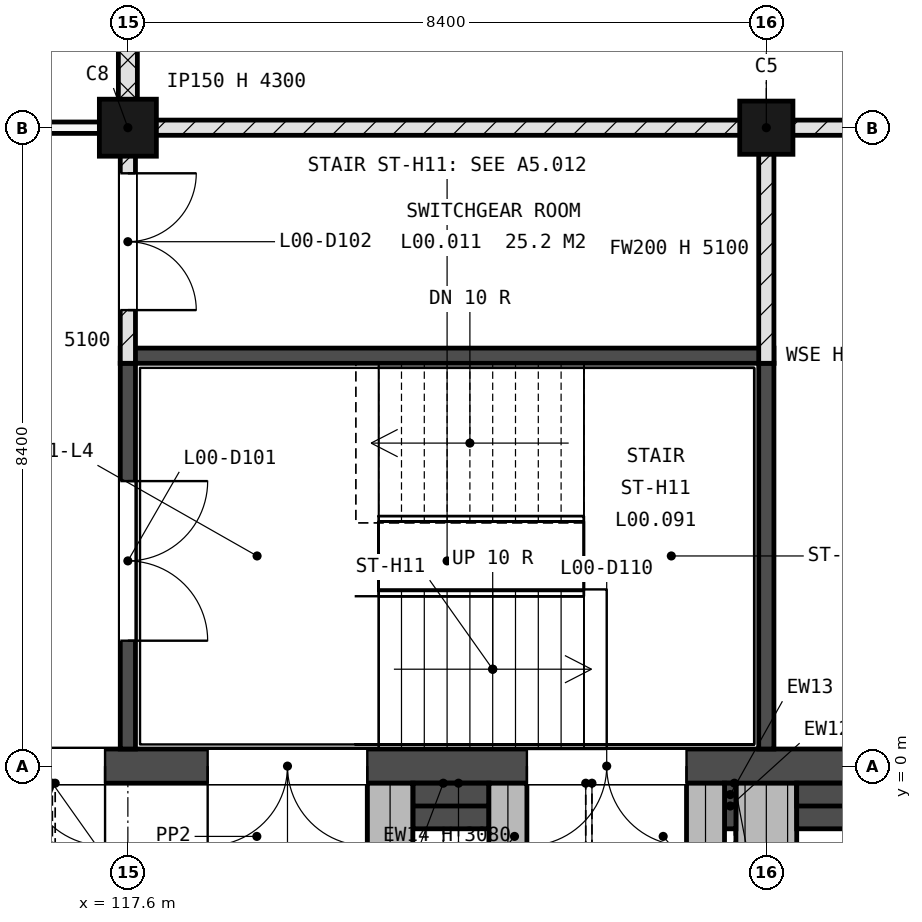
"""IFC4 building model, lengths in metres.
Left out: names, types, materials, properties, quantities, classifications, styles, units other than length and angle.
Written with IfcOpenShell. Run it as: python <this file> out.ifc"""

import sys

from ifc_helpers import new_model, si_unit, direction, frame, frame_2d, origin, origin_2d, place, context, subcontext, project, spatial, rectangle, extrude, element, fill, save


model = new_model("IFC4")
c1 = context("Model", 3, precision=1e-05, world=origin(), true_north=direction((0.0, 1.0)))
c2 = subcontext(c1, "Body", "Model", "MODEL_VIEW")
j1 = project(units=[si_unit("LENGTHUNIT", "METRE"), si_unit("PLANEANGLEUNIT", "RADIAN")], contexts=[c1])
p1 = place(None, origin())
s1 = spatial("IfcSite", under=j1, at=p1, CompositionType="ELEMENT")
p2 = place(p1, origin())
s2 = spatial("IfcBuilding", under=s1, at=p2, CompositionType="ELEMENT")
p3 = place(p2, origin())
s3 = spatial("IfcBuildingStorey", under=s2, at=p3, CompositionType="ELEMENT", Elevation=0.0)
p4 = place(p3, frame((117.6, 8.4, -0.3), z_axis=(0.0, 0.0, 1.0), x_axis=(1.0, 0.0, 0.0)))
e1 = element("IfcColumn", 1, at=p4, inside=s3, PredefinedType="COLUMN", context=c2, shape_type="SweptSolid", body=[
    extrude(rectangle(XDim=0.75, YDim=0.75, at=origin_2d()), origin(), (0.0, 0.0, 1.0), 5.4),
])
p5 = place(p3, frame((126.0, 8.4, -0.3), z_axis=(0.0, 0.0, 1.0), x_axis=(1.0, 0.0, 0.0)))
e2 = element("IfcColumn", 2, at=p5, inside=s3, PredefinedType="COLUMN", context=c2, shape_type="SweptSolid", body=[
    extrude(rectangle(XDim=0.7, YDim=0.7, at=origin_2d()), origin(), (0.0, 0.0, 1.0), 5.4),
])
p6 = place(p3, frame((0.0, 0.0, -0.3), z_axis=(0.0, 0.0, 1.0), x_axis=(1.0, 0.0, 0.0)))
e3 = element("IfcWall", 3, at=p6, inside=s3, PredefinedType="SOLIDWALL", context=c2, shape_type="SweptSolid", body=[
    extrude(rectangle(XDim=168.0, YDim=0.45, at=frame_2d((84.0, 0.0))), origin(), (0.0, 0.0, 1.0), 5.4),
])
p7 = place(p6, frame((34.8, 0.0, 2.7)))
e4 = element("IfcOpeningElement", 4, at=p7, cuts=e3, PredefinedType="OPENING", context=c2, shape_type="SweptSolid", body=[
    extrude(rectangle(XDim=1.8, YDim=1.2, at=frame_2d((0.9, 0.6))), frame((0.0, 0.235, 0.0), z_axis=(0.0, -1.0, 0.0), x_axis=(1.0, 0.0, 0.0)), (0.0, 0.0, 1.0), 0.47),
])
p8 = place(p6, frame((69.075, 0.0, 1.5)))
e5 = element("IfcOpeningElement", 5, at=p8, cuts=e3, PredefinedType="OPENING", context=c2, shape_type="SweptSolid", body=[
    extrude(rectangle(XDim=0.45, YDim=2.4, at=frame_2d((0.225, 1.2))), frame((0.0, 0.235, 0.0), z_axis=(0.0, -1.0, 0.0), x_axis=(1.0, 0.0, 0.0)), (0.0, 0.0, 1.0), 0.47),
])
p9 = place(p6, frame((73.275, 0.0, 1.5)))
e6 = element("IfcOpeningElement", 6, at=p9, cuts=e3, PredefinedType="OPENING", context=c2, shape_type="SweptSolid", body=[
    extrude(rectangle(XDim=0.45, YDim=2.4, at=frame_2d((0.225, 1.2))), frame((0.0, 0.235, 0.0), z_axis=(0.0, -1.0, 0.0), x_axis=(1.0, 0.0, 0.0)), (0.0, 0.0, 1.0), 0.47),
])
p10 = place(p6, frame((135.0, 0.0, 2.7)))
e7 = element("IfcOpeningElement", 7, at=p10, cuts=e3, PredefinedType="OPENING", context=c2, shape_type="SweptSolid", body=[
    extrude(rectangle(XDim=1.8, YDim=1.2, at=frame_2d((0.9, 0.6))), frame((0.0, 0.235, 0.0), z_axis=(0.0, -1.0, 0.0), x_axis=(1.0, 0.0, 0.0)), (0.0, 0.0, 1.0), 0.47),
])
p11 = place(p6, frame((144.0, 0.0, 2.7)))
e8 = element("IfcOpeningElement", 8, at=p11, cuts=e3, PredefinedType="OPENING", context=c2, shape_type="SweptSolid", body=[
    extrude(rectangle(XDim=1.8, YDim=1.2, at=frame_2d((0.9, 0.6))), frame((0.0, 0.235, 0.0), z_axis=(0.0, -1.0, 0.0), x_axis=(1.0, 0.0, 0.0)), (0.0, 0.0, 1.0), 0.47),
])
p12 = place(p6, frame((114.6, 0.0, 0.3), z_axis=(0.0, 0.0, 1.0), x_axis=(-1.0, 0.0, 0.0)))
e9 = element("IfcOpeningElement", 9, at=p12, cuts=e3, PredefinedType="OPENING", context=c2, shape_type="SweptSolid", body=[
    extrude(rectangle(XDim=2.1, YDim=2.2, at=frame_2d((1.05, 1.1))), frame((0.0, 0.235, 0.0), z_axis=(0.0, -1.0, 0.0), x_axis=(1.0, 0.0, 0.0)), (0.0, 0.0, 1.0), 0.47),
])
p13 = place(p6, frame((117.3, 0.0, 0.3), z_axis=(0.0, 0.0, 1.0), x_axis=(-1.0, 0.0, 0.0)))
e10 = element("IfcOpeningElement", 10, at=p13, cuts=e3, PredefinedType="OPENING", context=c2, shape_type="SweptSolid", body=[
    extrude(rectangle(XDim=2.1, YDim=2.2, at=frame_2d((1.05, 1.1))), frame((0.0, 0.235, 0.0), z_axis=(0.0, -1.0, 0.0), x_axis=(1.0, 0.0, 0.0)), (0.0, 0.0, 1.0), 0.47),
])
p14 = place(p6, frame((106.05, 0.0, 0.3), z_axis=(0.0, 0.0, 1.0), x_axis=(-1.0, 0.0, 0.0)))
e11 = element("IfcOpeningElement", 11, at=p14, cuts=e3, PredefinedType="OPENING", context=c2, shape_type="SweptSolid", body=[
    extrude(rectangle(XDim=2.1, YDim=2.2, at=frame_2d((1.05, 1.1))), frame((0.0, 0.235, 0.0), z_axis=(0.0, -1.0, 0.0), x_axis=(1.0, 0.0, 0.0)), (0.0, 0.0, 1.0), 0.47),
])
p15 = place(p6, frame((57.25, 0.0, 0.3), z_axis=(0.0, 0.0, 1.0), x_axis=(-1.0, 0.0, 0.0)))
e12 = element("IfcOpeningElement", 12, at=p15, cuts=e3, PredefinedType="OPENING", context=c2, shape_type="SweptSolid", body=[
    extrude(rectangle(XDim=2.1, YDim=2.2, at=frame_2d((1.05, 1.1))), frame((0.0, 0.235, 0.0), z_axis=(0.0, -1.0, 0.0), x_axis=(1.0, 0.0, 0.0)), (0.0, 0.0, 1.0), 0.47),
])
p16 = place(p6, frame((120.75, 0.0, 0.3), z_axis=(0.0, 0.0, 1.0), x_axis=(-1.0, 0.0, 0.0)))
e13 = element("IfcOpeningElement", 13, at=p16, cuts=e3, PredefinedType="OPENING", context=c2, shape_type="SweptSolid", body=[
    extrude(rectangle(XDim=2.1, YDim=2.2, at=frame_2d((1.05, 1.1))), frame((0.0, 0.235, 0.0), z_axis=(0.0, -1.0, 0.0), x_axis=(1.0, 0.0, 0.0)), (0.0, 0.0, 1.0), 0.47),
])
p17 = place(p6, frame((124.95, 0.0, 0.3), z_axis=(0.0, 0.0, 1.0), x_axis=(-1.0, 0.0, 0.0)))
e14 = element("IfcOpeningElement", 14, at=p17, cuts=e3, PredefinedType="OPENING", context=c2, shape_type="SweptSolid", body=[
    extrude(rectangle(XDim=2.1, YDim=2.2, at=frame_2d((1.05, 1.1))), frame((0.0, 0.235, 0.0), z_axis=(0.0, -1.0, 0.0), x_axis=(1.0, 0.0, 0.0)), (0.0, 0.0, 1.0), 0.47),
])
p18 = place(p6, frame((19.45, 0.0, 0.3), z_axis=(0.0, 0.0, 1.0), x_axis=(-1.0, 0.0, 0.0)))
e15 = element("IfcOpeningElement", 15, at=p18, cuts=e3, PredefinedType="OPENING", context=c2, shape_type="SweptSolid", body=[
    extrude(rectangle(XDim=2.1, YDim=2.2, at=frame_2d((1.05, 1.1))), frame((0.0, 0.235, 0.0), z_axis=(0.0, -1.0, 0.0), x_axis=(1.0, 0.0, 0.0)), (0.0, 0.0, 1.0), 0.47),
])
p19 = place(p6, frame((162.25, 0.0, 0.3), z_axis=(0.0, 0.0, 1.0), x_axis=(-1.0, 0.0, 0.0)))
e16 = element("IfcOpeningElement", 16, at=p19, cuts=e3, PredefinedType="OPENING", context=c2, shape_type="SweptSolid", body=[
    extrude(rectangle(XDim=2.1, YDim=2.2, at=frame_2d((1.05, 1.1))), frame((0.0, 0.235, 0.0), z_axis=(0.0, -1.0, 0.0), x_axis=(1.0, 0.0, 0.0)), (0.0, 0.0, 1.0), 0.47),
])
p20 = place(p6, frame((4.8, 0.0, 0.3), z_axis=(0.0, 0.0, 1.0), x_axis=(-1.0, 0.0, 0.0)))
e17 = element("IfcOpeningElement", 17, at=p20, cuts=e3, PredefinedType="OPENING", context=c2, shape_type="SweptSolid", body=[
    extrude(rectangle(XDim=1.2, YDim=2.2, at=frame_2d((0.6, 1.1))), frame((0.0, 0.235, 0.0), z_axis=(0.0, -1.0, 0.0), x_axis=(1.0, 0.0, 0.0)), (0.0, 0.0, 1.0), 0.47),
])
p21 = place(p6, frame((64.8, 0.0, 0.3), z_axis=(0.0, 0.0, 1.0), x_axis=(-1.0, 0.0, 0.0)))
e18 = element("IfcOpeningElement", 18, at=p21, cuts=e3, PredefinedType="OPENING", context=c2, shape_type="SweptSolid", body=[
    extrude(rectangle(XDim=1.2, YDim=2.2, at=frame_2d((0.6, 1.1))), frame((0.0, 0.235, 0.0), z_axis=(0.0, -1.0, 0.0), x_axis=(1.0, 0.0, 0.0)), (0.0, 0.0, 1.0), 0.47),
])
p22 = place(p6, frame((81.0, 0.0, 0.3), z_axis=(0.0, 0.0, 1.0), x_axis=(-1.0, 0.0, 0.0)))
e19 = element("IfcOpeningElement", 19, at=p22, cuts=e3, PredefinedType="OPENING", context=c2, shape_type="SweptSolid", body=[
    extrude(rectangle(XDim=2.4, YDim=2.4, at=frame_2d((1.2, 1.2))), frame((0.0, 0.235, 0.0), z_axis=(0.0, -1.0, 0.0), x_axis=(1.0, 0.0, 0.0)), (0.0, 0.0, 1.0), 0.47),
])
p23 = place(p6, frame((97.8, 0.0, 0.3), z_axis=(0.0, 0.0, 1.0), x_axis=(-1.0, 0.0, 0.0)))
e20 = element("IfcOpeningElement", 20, at=p23, cuts=e3, PredefinedType="OPENING", context=c2, shape_type="SweptSolid", body=[
    extrude(rectangle(XDim=2.4, YDim=2.4, at=frame_2d((1.2, 1.2))), frame((0.0, 0.235, 0.0), z_axis=(0.0, -1.0, 0.0), x_axis=(1.0, 0.0, 0.0)), (0.0, 0.0, 1.0), 0.47),
])
p24 = place(p6, frame((139.8, 0.0, 0.3), z_axis=(0.0, 0.0, 1.0), x_axis=(-1.0, 0.0, 0.0)))
e21 = element("IfcOpeningElement", 21, at=p24, cuts=e3, PredefinedType="OPENING", context=c2, shape_type="SweptSolid", body=[
    extrude(rectangle(XDim=2.4, YDim=2.1, at=frame_2d((1.2, 1.05))), frame((0.0, 0.235, 0.0), z_axis=(0.0, -1.0, 0.0), x_axis=(1.0, 0.0, 0.0)), (0.0, 0.0, 1.0), 0.47),
])
p25 = place(p6, frame((156.3, 0.0, 0.3), z_axis=(0.0, 0.0, 1.0), x_axis=(-1.0, 0.0, 0.0)))
e22 = element("IfcOpeningElement", 22, at=p25, cuts=e3, PredefinedType="OPENING", context=c2, shape_type="SweptSolid", body=[
    extrude(rectangle(XDim=1.8, YDim=2.2, at=frame_2d((0.9, 1.1))), frame((0.0, 0.235, 0.0), z_axis=(0.0, -1.0, 0.0), x_axis=(1.0, 0.0, 0.0)), (0.0, 0.0, 1.0), 0.47),
])
p26 = place(p3, frame((126.0, -0.225, 0.0), z_axis=(0.0, 0.0, 1.0), x_axis=(0.0, -1.0, 0.0)))
e23 = element("IfcWall", 23, at=p26, inside=s3, PredefinedType="SOLIDWALL", context=c2, shape_type="SweptSolid", body=[
    extrude(rectangle(XDim=0.9, YDim=0.8, at=frame_2d((0.45, 0.0))), origin(), (0.0, 0.0, 1.0), 5.1),
])
p27 = place(p3, frame((121.35, -0.525, 0.0), z_axis=(0.0, 0.0, 1.0), x_axis=(1.0, 0.0, 0.0)))
e24 = element("IfcWall", 24, at=p27, inside=s3, PredefinedType="SOLIDWALL", context=c2, shape_type="SweptSolid", body=[
    extrude(rectangle(XDim=1.0, YDim=0.6, at=frame_2d((0.5, 0.0))), origin(), (0.0, 0.0, 1.0), 0.45),
])
p28 = place(p3, frame((121.35, -0.375, 0.45), z_axis=(0.0, 0.0, 1.0), x_axis=(1.0, 0.0, 0.0)))
e25 = element("IfcWall", 25, at=p28, inside=s3, PredefinedType="SOLIDWALL", context=c2, shape_type="SweptSolid", body=[
    extrude(rectangle(XDim=1.0, YDim=0.3, at=frame_2d((0.5, 0.0))), origin(), (0.0, 0.0, 1.0), 0.45),
])
p29 = place(p3, frame((125.45, -0.525, 0.0), z_axis=(0.0, 0.0, 1.0), x_axis=(1.0, 0.0, 0.0)))
e26 = element("IfcWall", 26, at=p29, inside=s3, PredefinedType="SOLIDWALL", context=c2, shape_type="SweptSolid", body=[
    extrude(rectangle(XDim=0.15, YDim=0.6, at=frame_2d((0.075, 0.0))), origin(), (0.0, 0.0, 1.0), 0.45),
])
p30 = place(p3, frame((125.45, -0.375, 0.45), z_axis=(0.0, 0.0, 1.0), x_axis=(1.0, 0.0, 0.0)))
e27 = element("IfcWall", 27, at=p30, inside=s3, PredefinedType="SOLIDWALL", context=c2, shape_type="SweptSolid", body=[
    extrude(rectangle(XDim=0.15, YDim=0.3, at=frame_2d((0.075, 0.0))), origin(), (0.0, 0.0, 1.0), 0.45),
])
p31 = place(p3, frame((126.4, -0.525, 0.0), z_axis=(0.0, 0.0, 1.0), x_axis=(1.0, 0.0, 0.0)))
e28 = element("IfcWall", 28, at=p31, inside=s3, PredefinedType="SOLIDWALL", context=c2, shape_type="SweptSolid", body=[
    extrude(rectangle(XDim=7.6, YDim=0.6, at=frame_2d((3.8, 0.0))), origin(), (0.0, 0.0, 1.0), 0.45),
])
p32 = place(p3, frame((126.4, -0.375, 0.45), z_axis=(0.0, 0.0, 1.0), x_axis=(1.0, 0.0, 0.0)))
e29 = element("IfcWall", 29, at=p32, inside=s3, PredefinedType="SOLIDWALL", context=c2, shape_type="SweptSolid", body=[
    extrude(rectangle(XDim=7.6, YDim=0.3, at=frame_2d((3.8, 0.0))), origin(), (0.0, 0.0, 1.0), 0.45),
])
p33 = place(p3, frame((121.05, -0.225, 0.0), z_axis=(0.0, 0.0, 1.0), x_axis=(0.0, -1.0, 0.0)))
e30 = element("IfcWall", 30, at=p33, inside=s3, PredefinedType="SOLIDWALL", context=c2, shape_type="SweptSolid", body=[
    extrude(rectangle(XDim=1.4, YDim=0.6, at=frame_2d((0.7, 0.0))), origin(), (0.0, 0.0, 1.0), 4.45),
])
for number, where, z_axis, x_axis in (
    (31, (122.6, -0.225, 0.0), (0.0, 0.0, 1.0), (0.0, -1.0, 0.0)),
    (32, (125.2, -0.225, 0.0), (0.0, 0.0, 1.0), (0.0, -1.0, 0.0)),
):
    element("IfcWall", number, at=place(p3, frame(where, z_axis=z_axis, x_axis=x_axis)), inside=s3, PredefinedType="SOLIDWALL", context=c2, shape_type="SweptSolid", body=[
        extrude(rectangle(XDim=1.4, YDim=0.5, at=frame_2d((0.7, 0.0))), origin(), (0.0, 0.0, 1.0), 3.08),
    ])
p34 = place(p3, frame((117.5, 5.4, 0.0), z_axis=(0.0, 0.0, 1.0), x_axis=(1.0, 0.0, 0.0)))
e33 = element("IfcWall", 33, at=p34, inside=s3, PredefinedType="SHEAR", context=c2, shape_type="SweptSolid", body=[
    extrude(rectangle(XDim=8.6, YDim=0.2, at=frame_2d((4.3, 0.0))), origin(), (0.0, 0.0, 1.0), 5.1),
])
p35 = place(p3, frame((117.6, 0.225, 0.0), z_axis=(0.0, 0.0, 1.0), x_axis=(0.0, 1.0, 0.0)))
e34 = element("IfcWall", 34, at=p35, inside=s3, PredefinedType="SHEAR", context=c2, shape_type="SweptSolid", body=[
    extrude(rectangle(XDim=5.075, YDim=0.2, at=frame_2d((2.538, 0.0))), origin(), (0.0, 0.0, 1.0), 5.1),
])
p36 = place(p35, frame((1.425, 0.0, 0.0)))
e35 = element("IfcOpeningElement", 35, at=p36, cuts=e34, PredefinedType="OPENING", context=c2, shape_type="SweptSolid", body=[
    extrude(rectangle(XDim=2.1, YDim=2.1, at=frame_2d((1.05, 1.05))), frame((0.0, 0.11, 0.0), z_axis=(0.0, -1.0, 0.0), x_axis=(1.0, 0.0, 0.0)), (0.0, 0.0, 1.0), 0.22),
])
p37 = place(p3, frame((126.0, 0.225, 0.0), z_axis=(0.0, 0.0, 1.0), x_axis=(0.0, 1.0, 0.0)))
e36 = element("IfcWall", 36, at=p37, inside=s3, PredefinedType="SHEAR", context=c2, shape_type="SweptSolid", body=[
    extrude(rectangle(XDim=5.075, YDim=0.2, at=frame_2d((2.538, 0.0))), origin(), (0.0, 0.0, 1.0), 5.1),
])
p38 = place(p3, frame((92.755, 8.4, 0.0), z_axis=(0.0, 0.0, 1.0), x_axis=(1.0, 0.0, 0.0)))
e37 = element("IfcWall", 37, at=p38, inside=s3, PredefinedType="PARTITIONING", context=c2, shape_type="SweptSolid", body=[
    extrude(rectangle(XDim=24.845, YDim=0.15, at=frame_2d((12.423, 0.0))), origin(), (0.0, 0.0, 1.0), 4.3),
])
p39 = place(p38, frame((21.095, 0.0, 0.0)))
e38 = element("IfcOpeningElement", 38, at=p39, cuts=e37, PredefinedType="OPENING", context=c2, shape_type="SweptSolid", body=[
    extrude(rectangle(XDim=2.1, YDim=2.4, at=frame_2d((1.05, 1.2))), frame((0.0, 0.085, 0.0), z_axis=(0.0, -1.0, 0.0), x_axis=(1.0, 0.0, 0.0)), (0.0, 0.0, 1.0), 0.17),
])
p40 = place(p3, frame((117.6, 8.4, 0.0), z_axis=(0.0, 0.0, 1.0), x_axis=(1.0, 0.0, 0.0)))
e39 = element("IfcWall", 39, at=p40, inside=s3, PredefinedType="SOLIDWALL", context=c2, shape_type="SweptSolid", body=[
    extrude(rectangle(XDim=42.0, YDim=0.2, at=frame_2d((21.0, 0.0))), origin(), (0.0, 0.0, 1.0), 4.3),
])
p41 = place(p40, frame((37.3, 0.0, 0.0)))
e40 = element("IfcOpeningElement", 40, at=p41, cuts=e39, PredefinedType="OPENING", context=c2, shape_type="SweptSolid", body=[
    extrude(rectangle(XDim=1.0, YDim=2.1, at=frame_2d((0.5, 1.05))), frame((0.0, 0.11, 0.0), z_axis=(0.0, -1.0, 0.0), x_axis=(1.0, 0.0, 0.0)), (0.0, 0.0, 1.0), 0.22),
])
p42 = place(p3, frame((117.6, 5.3, 0.0), z_axis=(0.0, 0.0, 1.0), x_axis=(0.0, 1.0, 0.0)))
e41 = element("IfcWall", 41, at=p42, inside=s3, PredefinedType="SOLIDWALL", context=c2, shape_type="SweptSolid", body=[
    extrude(rectangle(XDim=3.0, YDim=0.2, at=frame_2d((1.5, 0.0))), origin(), (0.0, 0.0, 1.0), 5.1),
])
p43 = place(p42, frame((0.7, 0.0, 0.0)))
e42 = element("IfcOpeningElement", 42, at=p43, cuts=e41, PredefinedType="OPENING", context=c2, shape_type="SweptSolid", body=[
    extrude(rectangle(XDim=1.8, YDim=2.4, at=frame_2d((0.9, 1.2))), frame((0.0, 0.11, 0.0), z_axis=(0.0, -1.0, 0.0), x_axis=(1.0, 0.0, 0.0)), (0.0, 0.0, 1.0), 0.22),
])
p44 = place(p3, frame((117.6, 8.5, 0.0), z_axis=(0.0, 0.0, 1.0), x_axis=(0.0, 1.0, 0.0)))
e43 = element("IfcWall", 43, at=p44, inside=s3, PredefinedType="SOLIDWALL", context=c2, shape_type="SweptSolid", body=[
    extrude(rectangle(XDim=16.625, YDim=0.25, at=frame_2d((8.312, 0.0))), origin(), (0.0, 0.0, 1.0), 4.3),
])
p45 = place(p44, frame((1.64, 0.0, 0.0)))
e44 = element("IfcOpeningElement", 44, at=p45, cuts=e43, PredefinedType="OPENING", context=c2, shape_type="SweptSolid", body=[
    extrude(rectangle(XDim=1.0, YDim=2.1, at=frame_2d((0.5, 1.05))), frame((0.0, 0.135, 0.0), z_axis=(0.0, -1.0, 0.0), x_axis=(1.0, 0.0, 0.0)), (0.0, 0.0, 1.0), 0.27),
])
p46 = place(p3, frame((126.0, 5.3, 0.0), z_axis=(0.0, 0.0, 1.0), x_axis=(0.0, 1.0, 0.0)))
e45 = element("IfcWall", 45, at=p46, inside=s3, PredefinedType="SOLIDWALL", context=c2, shape_type="SweptSolid", body=[
    extrude(rectangle(XDim=3.0, YDim=0.2, at=frame_2d((1.5, 0.0))), origin(), (0.0, 0.0, 1.0), 5.1),
])
p47 = place(p13, origin())
e46 = element("IfcDoor", 46, at=p47, inside=s3, OperationType="SINGLE_SWING_LEFT", PredefinedType="DOOR", context=c2, shape_type="SweptSolid", body=[
    extrude(rectangle(XDim=2.1, YDim=0.013, at=frame_2d((1.05, 0.007))), frame((0.0, 0.115, 0.0), z_axis=(0.0, -1.0, 0.0), x_axis=(1.0, 0.0, 0.0)), (0.0, 0.0, 1.0), 0.23),
    extrude(rectangle(XDim=0.075, YDim=2.112, at=frame_2d((0.038, 1.069))), frame((0.0, 0.125, 0.0), z_axis=(0.0, -1.0, 0.0), x_axis=(1.0, 0.0, 0.0)), (0.0, 0.0, 1.0), 0.25),
    extrude(rectangle(XDim=0.075, YDim=2.112, at=frame_2d((2.062, 1.069))), frame((0.0, 0.125, 0.0), z_axis=(0.0, -1.0, 0.0), x_axis=(1.0, 0.0, 0.0)), (0.0, 0.0, 1.0), 0.25),
    extrude(rectangle(XDim=2.1, YDim=0.075, at=frame_2d((1.05, 2.163))), frame((0.0, 0.115, 0.0), z_axis=(0.0, -1.0, 0.0), x_axis=(1.0, 0.0, 0.0)), (0.0, 0.0, 1.0), 0.23),
    extrude(rectangle(XDim=1.95, YDim=0.3, at=frame_2d((1.05, 0.163))), frame((0.0, 0.02, 0.0), z_axis=(0.0, -1.0, 0.0), x_axis=(1.0, 0.0, 0.0)), (0.0, 0.0, 1.0), 0.04),
    extrude(rectangle(XDim=1.95, YDim=0.12, at=frame_2d((1.05, 2.065))), frame((0.0, 0.02, 0.0), z_axis=(0.0, -1.0, 0.0), x_axis=(1.0, 0.0, 0.0)), (0.0, 0.0, 1.0), 0.04),
    extrude(rectangle(XDim=0.09, YDim=1.692, at=frame_2d((0.12, 1.159))), frame((0.0, 0.025, 0.0), z_axis=(0.0, -1.0, 0.0), x_axis=(1.0, 0.0, 0.0)), (0.0, 0.0, 1.0), 0.05),
    extrude(rectangle(XDim=0.18, YDim=1.692, at=frame_2d((1.05, 1.159))), frame((0.0, 0.025, 0.0), z_axis=(0.0, -1.0, 0.0), x_axis=(1.0, 0.0, 0.0)), (0.0, 0.0, 1.0), 0.05),
    extrude(rectangle(XDim=0.09, YDim=1.692, at=frame_2d((1.98, 1.159))), frame((0.0, 0.025, 0.0), z_axis=(0.0, -1.0, 0.0), x_axis=(1.0, 0.0, 0.0)), (0.0, 0.0, 1.0), 0.05),
    extrude(rectangle(XDim=0.795, YDim=1.692, at=frame_2d((0.562, 1.159))), frame((0.0, 0.012, 0.0), z_axis=(0.0, -1.0, 0.0), x_axis=(1.0, 0.0, 0.0)), (0.0, 0.0, 1.0), 0.024),
    extrude(rectangle(XDim=0.795, YDim=1.692, at=frame_2d((1.538, 1.159))), frame((0.0, 0.012, 0.0), z_axis=(0.0, -1.0, 0.0), x_axis=(1.0, 0.0, 0.0)), (0.0, 0.0, 1.0), 0.024),
])
fill(e10, e46)
p48 = place(p16, origin())
e47 = element("IfcDoor", 47, at=p48, inside=s3, OperationType="SINGLE_SWING_LEFT", PredefinedType="DOOR", context=c2, shape_type="SweptSolid", body=[
    extrude(rectangle(XDim=2.1, YDim=0.013, at=frame_2d((1.05, 0.007))), frame((0.0, 0.115, 0.0), z_axis=(0.0, -1.0, 0.0), x_axis=(1.0, 0.0, 0.0)), (0.0, 0.0, 1.0), 0.23),
    extrude(rectangle(XDim=0.075, YDim=2.112, at=frame_2d((0.038, 1.069))), frame((0.0, 0.125, 0.0), z_axis=(0.0, -1.0, 0.0), x_axis=(1.0, 0.0, 0.0)), (0.0, 0.0, 1.0), 0.25),
    extrude(rectangle(XDim=0.075, YDim=2.112, at=frame_2d((2.062, 1.069))), frame((0.0, 0.125, 0.0), z_axis=(0.0, -1.0, 0.0), x_axis=(1.0, 0.0, 0.0)), (0.0, 0.0, 1.0), 0.25),
    extrude(rectangle(XDim=2.1, YDim=0.075, at=frame_2d((1.05, 2.163))), frame((0.0, 0.115, 0.0), z_axis=(0.0, -1.0, 0.0), x_axis=(1.0, 0.0, 0.0)), (0.0, 0.0, 1.0), 0.23),
    extrude(rectangle(XDim=1.95, YDim=2.112, at=frame_2d((1.05, 1.069))), frame((0.0, 0.025, 0.0), z_axis=(0.0, -1.0, 0.0), x_axis=(1.0, 0.0, 0.0)), (0.0, 0.0, 1.0), 0.05),
])
fill(e13, e47)
p49 = place(p17, origin())
e48 = element("IfcDoor", 48, at=p49, inside=s3, OperationType="SINGLE_SWING_LEFT", PredefinedType="DOOR", context=c2, shape_type="SweptSolid", body=[
    extrude(rectangle(XDim=2.1, YDim=0.013, at=frame_2d((1.05, 0.007))), frame((0.0, 0.115, 0.0), z_axis=(0.0, -1.0, 0.0), x_axis=(1.0, 0.0, 0.0)), (0.0, 0.0, 1.0), 0.23),
    extrude(rectangle(XDim=0.075, YDim=2.112, at=frame_2d((0.038, 1.069))), frame((0.0, 0.125, 0.0), z_axis=(0.0, -1.0, 0.0), x_axis=(1.0, 0.0, 0.0)), (0.0, 0.0, 1.0), 0.25),
    extrude(rectangle(XDim=0.075, YDim=2.112, at=frame_2d((2.062, 1.069))), frame((0.0, 0.125, 0.0), z_axis=(0.0, -1.0, 0.0), x_axis=(1.0, 0.0, 0.0)), (0.0, 0.0, 1.0), 0.25),
    extrude(rectangle(XDim=2.1, YDim=0.075, at=frame_2d((1.05, 2.163))), frame((0.0, 0.115, 0.0), z_axis=(0.0, -1.0, 0.0), x_axis=(1.0, 0.0, 0.0)), (0.0, 0.0, 1.0), 0.23),
    extrude(rectangle(XDim=1.95, YDim=2.112, at=frame_2d((1.05, 1.069))), frame((0.0, 0.025, 0.0), z_axis=(0.0, -1.0, 0.0), x_axis=(1.0, 0.0, 0.0)), (0.0, 0.0, 1.0), 0.05),
])
fill(e14, e48)
p50 = place(p36, origin())
e49 = element("IfcDoor", 49, at=p50, inside=s3, OperationType="DOUBLE_DOOR_SINGLE_SWING", PredefinedType="DOOR", context=c2, shape_type="SweptSolid", body=[
    extrude(rectangle(XDim=2.1, YDim=2.1, at=frame_2d((1.05, 1.05))), frame((0.0, 0.025, 0.0), z_axis=(0.0, -1.0, 0.0), x_axis=(1.0, 0.0, 0.0)), (0.0, 0.0, 1.0), 0.05),
])
fill(e35, e49)
p51 = place(p43, origin())
e50 = element("IfcDoor", 50, at=p51, inside=s3, OperationType="DOUBLE_DOOR_SINGLE_SWING", PredefinedType="DOOR", context=c2, shape_type="SweptSolid", body=[
    extrude(rectangle(XDim=1.8, YDim=2.4, at=frame_2d((0.9, 1.2))), frame((0.0, 0.025, 0.0), z_axis=(0.0, -1.0, 0.0), x_axis=(1.0, 0.0, 0.0)), (0.0, 0.0, 1.0), 0.05),
])
fill(e42, e50)
save(model, sys.argv[1])
